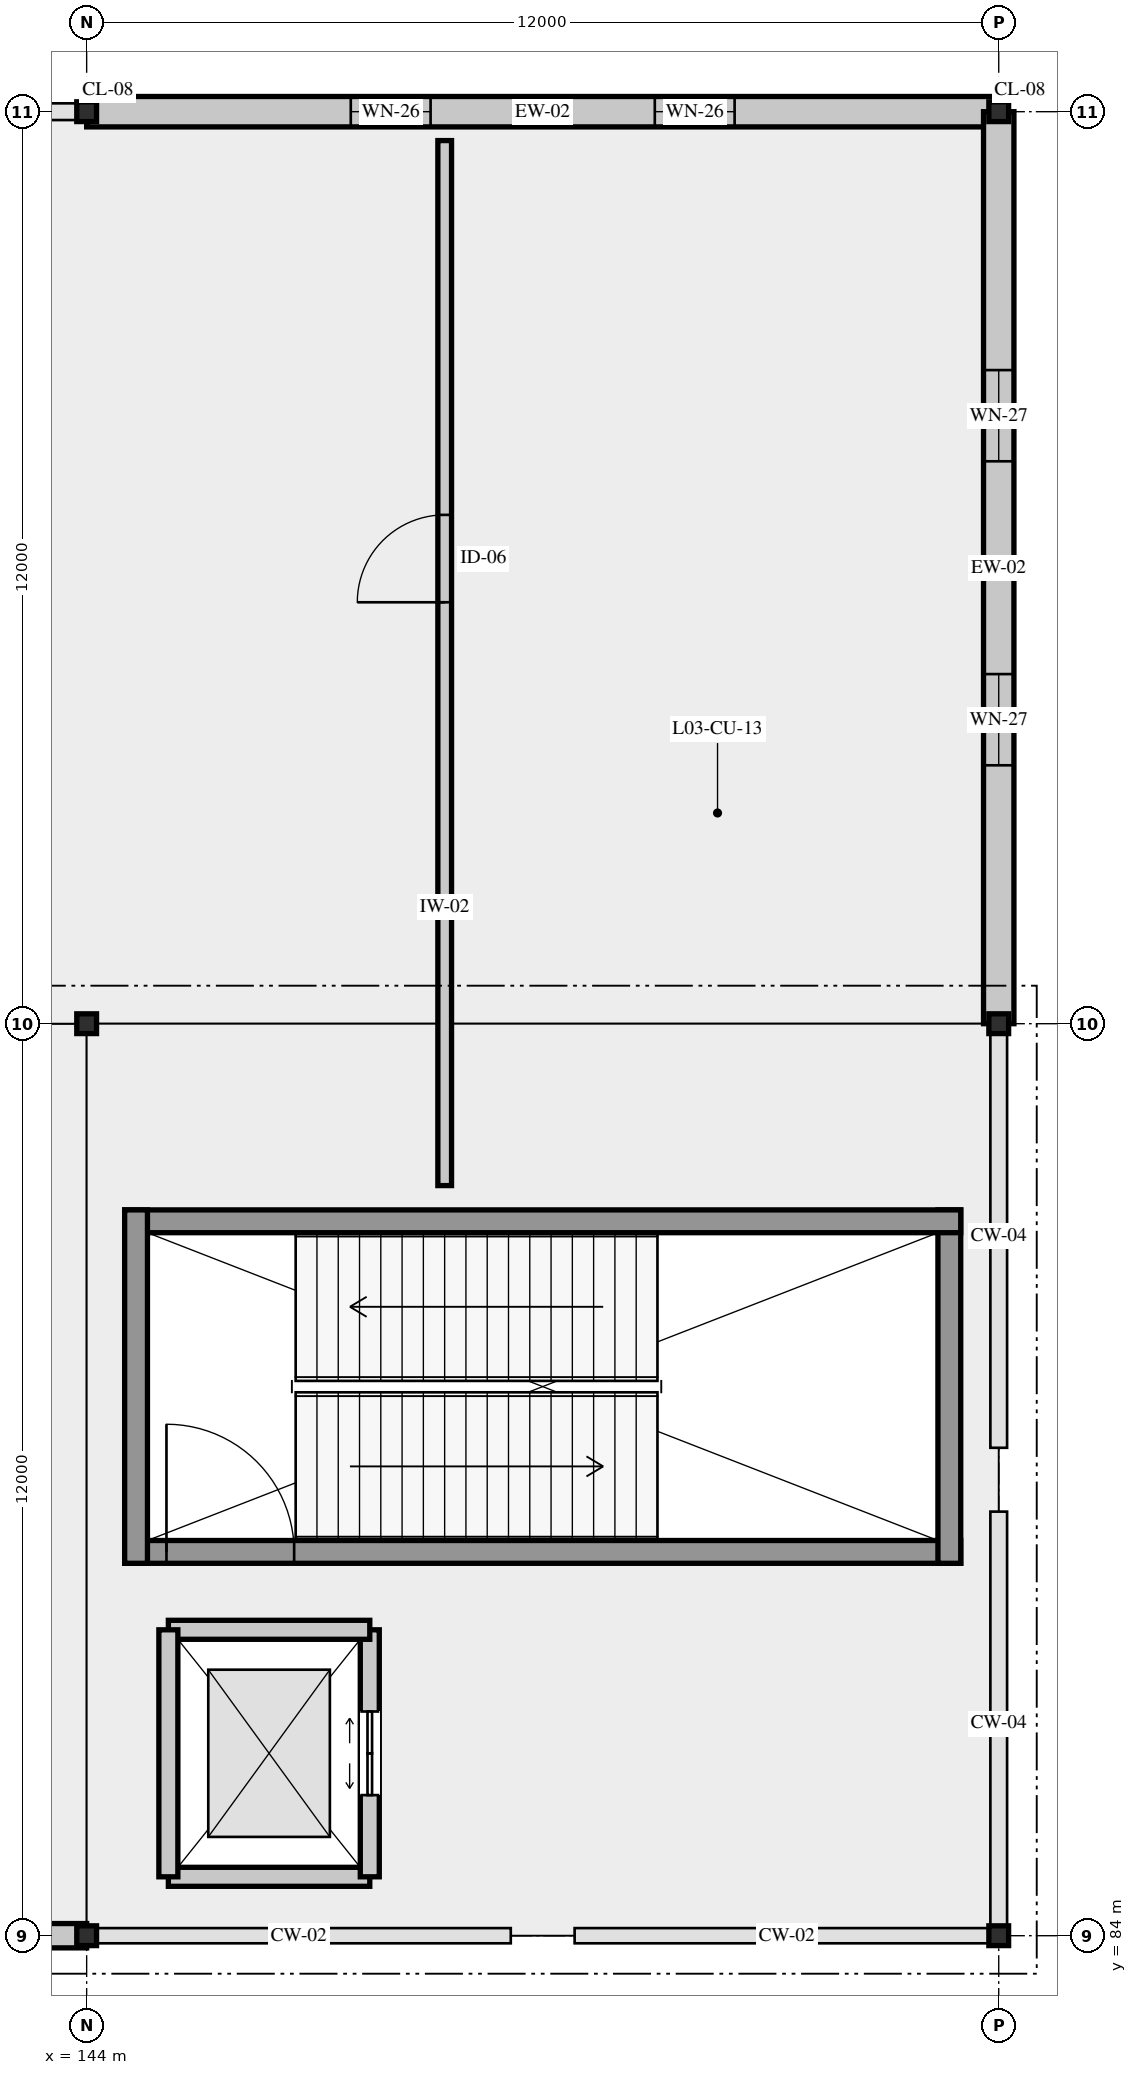
"""IFC4 building model, lengths in metres.
Left out: names, types, materials, properties, quantities, classifications, styles, units other than length and angle.
Written with IfcOpenShell. Run it as: python <this file> out.ifc"""

import sys

from ifc_helpers import new_model, si_unit, direction, frame, frame_2d, origin, origin_2d, place, context, subcontext, project, spatial, rectangle, i_section, extrude, element, fill, save


model = new_model("IFC4")
c1 = context("Model", 3, precision=1e-05, world=origin(), true_north=direction((0.0, 1.0)))
c2 = subcontext(c1, "Body", "Model", "MODEL_VIEW")
j1 = project(units=[si_unit("LENGTHUNIT", "METRE"), si_unit("PLANEANGLEUNIT", "RADIAN")], contexts=[c1])
p1 = place(None, origin())
s1 = spatial("IfcSite", under=j1, at=p1, CompositionType="ELEMENT")
p2 = place(p1, origin())
s2 = spatial("IfcBuilding", under=s1, at=p2, CompositionType="ELEMENT")
p3 = place(p2, frame((0.0, 0.0, 16.8)))
s3 = spatial("IfcBuildingStorey", under=s2, at=p3, CompositionType="ELEMENT", Elevation=16.8)
for number, where, z_axis, x_axis in (
    (1, (144.0, 84.0, 0.0), (0.0, 0.0, 1.0), (1.0, 0.0, 0.0)),
    (2, (144.0, 96.0, 0.0), (0.0, 0.0, 1.0), (1.0, 0.0, 0.0)),
    (3, (144.0, 108.0, 0.0), (0.0, 0.0, 1.0), (1.0, 0.0, 0.0)),
    (4, (156.0, 84.0, 0.0), (0.0, 0.0, 1.0), (1.0, 0.0, 0.0)),
    (5, (156.0, 96.0, 0.0), (0.0, 0.0, 1.0), (1.0, 0.0, 0.0)),
    (6, (156.0, 108.0, 0.0), (0.0, 0.0, 1.0), (1.0, 0.0, 0.0)),
):
    element("IfcColumn", number, at=place(p3, frame(where, z_axis=z_axis, x_axis=x_axis)), inside=s3, PredefinedType="COLUMN", context=c2, shape_type="SweptSolid", body=[
        extrude(i_section(OverallWidth=0.26, OverallDepth=0.26, WebThickness=0.01, FlangeThickness=0.018, FilletRadius=0.024, at=origin_2d()), origin(), (0.0, 0.0, 1.0), 6.6),
    ])
p4 = place(p3, frame((132.0, 84.0, 0.0), z_axis=(0.0, 0.0, 1.0), x_axis=(1.0, 0.0, 0.0)))
e7 = element("IfcWall", 7, at=p4, inside=s3, PredefinedType="SOLIDWALL", context=c2, shape_type="SweptSolid", body=[
    extrude(rectangle(XDim=12.0, YDim=0.32, at=frame_2d((6.0, 0.0))), origin(), (0.0, 0.0, 1.0), 5.75),
])
p5 = place(p4, frame((3.55, 0.0, 0.95)))
e8 = element("IfcOpeningElement", 8, at=p5, cuts=e7, PredefinedType="OPENING", context=c2, shape_type="SweptSolid", body=[
    extrude(rectangle(XDim=0.9, YDim=2.1, at=frame_2d((0.45, 1.05))), frame((0.0, 0.17, 0.0), z_axis=(0.0, -1.0, 0.0), x_axis=(1.0, 0.0, 0.0)), (0.0, 0.0, 1.0), 0.34),
])
p6 = place(p4, frame((7.55, 0.0, 0.95)))
e9 = element("IfcOpeningElement", 9, at=p6, cuts=e7, PredefinedType="OPENING", context=c2, shape_type="SweptSolid", body=[
    extrude(rectangle(XDim=0.9, YDim=2.1, at=frame_2d((0.45, 1.05))), frame((0.0, 0.17, 0.0), z_axis=(0.0, -1.0, 0.0), x_axis=(1.0, 0.0, 0.0)), (0.0, 0.0, 1.0), 0.34),
])
p7 = place(p3, frame((156.0, 108.0, 0.0), z_axis=(0.0, 0.0, 1.0), x_axis=(-1.0, 0.0, 0.0)))
e10 = element("IfcWall", 10, at=p7, inside=s3, PredefinedType="SOLIDWALL", context=c2, shape_type="SweptSolid", body=[
    extrude(rectangle(XDim=12.0, YDim=0.4, at=frame_2d((6.0, 0.0))), origin(), (0.0, 0.0, 1.0), 5.75),
])
p8 = place(p7, frame((3.475, 0.0, 0.95)))
e11 = element("IfcOpeningElement", 11, at=p8, cuts=e10, PredefinedType="OPENING", context=c2, shape_type="SweptSolid", body=[
    extrude(rectangle(XDim=1.05, YDim=2.1, at=frame_2d((0.525, 1.05))), frame((0.0, 0.21, 0.0), z_axis=(0.0, -1.0, 0.0), x_axis=(1.0, 0.0, 0.0)), (0.0, 0.0, 1.0), 0.42),
])
p9 = place(p7, frame((7.475, 0.0, 0.95)))
e12 = element("IfcOpeningElement", 12, at=p9, cuts=e10, PredefinedType="OPENING", context=c2, shape_type="SweptSolid", body=[
    extrude(rectangle(XDim=1.05, YDim=2.1, at=frame_2d((0.525, 1.05))), frame((0.0, 0.21, 0.0), z_axis=(0.0, -1.0, 0.0), x_axis=(1.0, 0.0, 0.0)), (0.0, 0.0, 1.0), 0.42),
])
p10 = place(p3, frame((156.0, 96.0, 0.0), z_axis=(0.0, 0.0, 1.0), x_axis=(0.0, 1.0, 0.0)))
e13 = element("IfcWall", 13, at=p10, inside=s3, PredefinedType="SOLIDWALL", context=c2, shape_type="SweptSolid", body=[
    extrude(rectangle(XDim=12.0, YDim=0.4, at=frame_2d((6.0, 0.0))), origin(), (0.0, 0.0, 1.0), 5.75),
])
p11 = place(p10, frame((3.4, 0.0, 0.95)))
e14 = element("IfcOpeningElement", 14, at=p11, cuts=e13, PredefinedType="OPENING", context=c2, shape_type="SweptSolid", body=[
    extrude(rectangle(XDim=1.2, YDim=2.1, at=frame_2d((0.6, 1.05))), frame((0.0, 0.21, 0.0), z_axis=(0.0, -1.0, 0.0), x_axis=(1.0, 0.0, 0.0)), (0.0, 0.0, 1.0), 0.42),
])
p12 = place(p10, frame((7.4, 0.0, 0.95)))
e15 = element("IfcOpeningElement", 15, at=p12, cuts=e13, PredefinedType="OPENING", context=c2, shape_type="SweptSolid", body=[
    extrude(rectangle(XDim=1.2, YDim=2.1, at=frame_2d((0.6, 1.05))), frame((0.0, 0.21, 0.0), z_axis=(0.0, -1.0, 0.0), x_axis=(1.0, 0.0, 0.0)), (0.0, 0.0, 1.0), 0.42),
])
p13 = place(p3, frame((144.5, 89.05, 0.0), z_axis=(0.0, 0.0, 1.0), x_axis=(1.0, 0.0, 0.0)))
e16 = element("IfcWall", 16, at=p13, inside=s3, PredefinedType="SHEAR", context=c2, shape_type="SweptSolid", body=[
    extrude(rectangle(XDim=11.0, YDim=0.3, at=frame_2d((5.5, 0.0))), origin(), (0.0, 0.0, 1.0), 6.35),
])
p14 = place(p13, frame((0.55, 0.0, 0.0)))
e17 = element("IfcOpeningElement", 17, at=p14, cuts=e16, PredefinedType="OPENING", context=c2, shape_type="SweptSolid", body=[
    extrude(rectangle(XDim=1.68, YDim=2.35, at=frame_2d((0.84, 1.175))), frame((0.0, 0.16, 0.0), z_axis=(0.0, -1.0, 0.0), x_axis=(1.0, 0.0, 0.0)), (0.0, 0.0, 1.0), 0.32),
])
p15 = place(p3, frame((155.35, 88.9, 0.0), z_axis=(0.0, 0.0, 1.0), x_axis=(0.0, 1.0, 0.0)))
e18 = element("IfcWall", 18, at=p15, inside=s3, PredefinedType="SHEAR", context=c2, shape_type="SweptSolid", body=[
    extrude(rectangle(XDim=4.65, YDim=0.3, at=frame_2d((2.325, 0.0))), origin(), (0.0, 0.0, 1.0), 6.35),
])
p16 = place(p3, frame((155.5, 93.4, 0.0), z_axis=(0.0, 0.0, 1.0), x_axis=(-1.0, 0.0, 0.0)))
e19 = element("IfcWall", 19, at=p16, inside=s3, PredefinedType="SHEAR", context=c2, shape_type="SweptSolid", body=[
    extrude(rectangle(XDim=11.0, YDim=0.3, at=frame_2d((5.5, 0.0))), origin(), (0.0, 0.0, 1.0), 6.35),
])
p17 = place(p3, frame((144.65, 93.55, 0.0), z_axis=(0.0, 0.0, 1.0), x_axis=(0.0, -1.0, 0.0)))
e20 = element("IfcWall", 20, at=p17, inside=s3, PredefinedType="SHEAR", context=c2, shape_type="SweptSolid", body=[
    extrude(rectangle(XDim=4.65, YDim=0.3, at=frame_2d((2.325, 0.0))), origin(), (0.0, 0.0, 1.0), 6.35),
])
p18 = place(p3, frame((145.075, 84.775, 0.0), z_axis=(0.0, 0.0, 1.0), x_axis=(1.0, 0.0, 0.0)))
e21 = element("IfcWall", 21, at=p18, inside=s3, PredefinedType="SOLIDWALL", context=c2, shape_type="SweptSolid", body=[
    extrude(rectangle(XDim=2.65, YDim=0.25, at=frame_2d((1.325, 0.0))), origin(), (0.0, 0.0, 1.0), 6.35),
])
p19 = place(p3, frame((147.725, 84.775, 0.0), z_axis=(0.0, 0.0, 1.0), x_axis=(0.0, 1.0, 0.0)))
e22 = element("IfcWall", 22, at=p19, inside=s3, PredefinedType="SOLIDWALL", context=c2, shape_type="SweptSolid", body=[
    extrude(rectangle(XDim=3.25, YDim=0.25, at=frame_2d((1.625, 0.0))), origin(), (0.0, 0.0, 1.0), 6.35),
])
p20 = place(p19, frame((1.075, 0.0, 0.0)))
e23 = element("IfcOpeningElement", 23, at=p20, cuts=e22, PredefinedType="OPENING", context=c2, shape_type="SweptSolid", body=[
    extrude(rectangle(XDim=1.1, YDim=2.2, at=frame_2d((0.55, 1.1))), frame((0.0, 0.135, 0.0), z_axis=(0.0, -1.0, 0.0), x_axis=(1.0, 0.0, 0.0)), (0.0, 0.0, 1.0), 0.27),
])
p21 = place(p3, frame((147.725, 88.025, 0.0), z_axis=(0.0, 0.0, 1.0), x_axis=(-1.0, 0.0, 0.0)))
e24 = element("IfcWall", 24, at=p21, inside=s3, PredefinedType="SOLIDWALL", context=c2, shape_type="SweptSolid", body=[
    extrude(rectangle(XDim=2.65, YDim=0.25, at=frame_2d((1.325, 0.0))), origin(), (0.0, 0.0, 1.0), 6.35),
])
p22 = place(p3, frame((145.075, 88.025, 0.0), z_axis=(0.0, 0.0, 1.0), x_axis=(0.0, -1.0, 0.0)))
e25 = element("IfcWall", 25, at=p22, inside=s3, PredefinedType="SOLIDWALL", context=c2, shape_type="SweptSolid", body=[
    extrude(rectangle(XDim=3.25, YDim=0.25, at=frame_2d((1.625, 0.0))), origin(), (0.0, 0.0, 1.0), 6.35),
])
p23 = place(p3, frame((148.711, 93.87, 0.0), z_axis=(0.0, 0.0, 1.0), x_axis=(0.0, 1.0, 0.0)))
e26 = element("IfcWall", 26, at=p23, inside=s3, PredefinedType="PARTITIONING", context=c2, shape_type="SweptSolid", body=[
    extrude(rectangle(XDim=13.75, YDim=0.18, at=frame_2d((6.875, 0.0))), origin(), (0.0, 0.0, 1.0), 5.87),
])
p24 = place(p23, frame((7.675, 0.0, 0.0)))
e27 = element("IfcOpeningElement", 27, at=p24, cuts=e26, PredefinedType="OPENING", context=c2, shape_type="SweptSolid", body=[
    extrude(rectangle(XDim=1.15, YDim=2.25, at=frame_2d((0.575, 1.125))), frame((0.0, 0.1, 0.0), z_axis=(0.0, -1.0, 0.0), x_axis=(1.0, 0.0, 0.0)), (0.0, 0.0, 1.0), 0.2),
])
p25 = place(p8, origin())
e28 = element("IfcWindow", 28, at=p25, inside=s3, PartitioningType="SINGLE_PANEL", PredefinedType="WINDOW", context=c2, shape_type="SweptSolid", body=[
    extrude(rectangle(XDim=1.05, YDim=2.1, at=frame_2d((0.525, 1.05))), frame((0.0, 0.03, 0.0), z_axis=(0.0, -1.0, 0.0), x_axis=(1.0, 0.0, 0.0)), (0.0, 0.0, 1.0), 0.06),
])
fill(e11, e28)
p26 = place(p9, origin())
e29 = element("IfcWindow", 29, at=p26, inside=s3, PartitioningType="SINGLE_PANEL", PredefinedType="WINDOW", context=c2, shape_type="SweptSolid", body=[
    extrude(rectangle(XDim=1.05, YDim=2.1, at=frame_2d((0.525, 1.05))), frame((0.0, 0.03, 0.0), z_axis=(0.0, -1.0, 0.0), x_axis=(1.0, 0.0, 0.0)), (0.0, 0.0, 1.0), 0.06),
])
fill(e12, e29)
p27 = place(p11, origin())
e30 = element("IfcWindow", 30, at=p27, inside=s3, PartitioningType="SINGLE_PANEL", PredefinedType="WINDOW", context=c2, shape_type="SweptSolid", body=[
    extrude(rectangle(XDim=1.2, YDim=2.1, at=frame_2d((0.6, 1.05))), frame((0.0, 0.03, 0.0), z_axis=(0.0, -1.0, 0.0), x_axis=(1.0, 0.0, 0.0)), (0.0, 0.0, 1.0), 0.06),
])
fill(e14, e30)
p28 = place(p12, origin())
e31 = element("IfcWindow", 31, at=p28, inside=s3, PartitioningType="SINGLE_PANEL", PredefinedType="WINDOW", context=c2, shape_type="SweptSolid", body=[
    extrude(rectangle(XDim=1.2, YDim=2.1, at=frame_2d((0.6, 1.05))), frame((0.0, 0.03, 0.0), z_axis=(0.0, -1.0, 0.0), x_axis=(1.0, 0.0, 0.0)), (0.0, 0.0, 1.0), 0.06),
])
fill(e15, e31)
p29 = place(p14, origin())
e32 = element("IfcDoor", 32, at=p29, inside=s3, OperationType="DOUBLE_DOOR_SINGLE_SWING", PredefinedType="DOOR", context=c2, shape_type="SweptSolid", body=[
    extrude(rectangle(XDim=1.68, YDim=2.35, at=frame_2d((0.84, 1.175))), frame((0.0, 0.025, 0.0), z_axis=(0.0, -1.0, 0.0), x_axis=(1.0, 0.0, 0.0)), (0.0, 0.0, 1.0), 0.05),
])
fill(e17, e32)
p30 = place(p20, origin())
e33 = element("IfcDoor", 33, at=p30, inside=s3, OperationType="SLIDING_TO_LEFT", PredefinedType="DOOR", context=c2, shape_type="SweptSolid", body=[
    extrude(rectangle(XDim=1.1, YDim=2.2, at=frame_2d((0.55, 1.1))), frame((0.0, 0.025, 0.0), z_axis=(0.0, -1.0, 0.0), x_axis=(1.0, 0.0, 0.0)), (0.0, 0.0, 1.0), 0.05),
])
fill(e23, e33)
p31 = place(p24, origin())
e34 = element("IfcDoor", 34, at=p31, inside=s3, OperationType="SINGLE_SWING_LEFT", PredefinedType="DOOR", context=c2, shape_type="SweptSolid", body=[
    extrude(rectangle(XDim=1.15, YDim=2.25, at=frame_2d((0.575, 1.125))), frame((0.0, 0.025, 0.0), z_axis=(0.0, -1.0, 0.0), x_axis=(1.0, 0.0, 0.0)), (0.0, 0.0, 1.0), 0.05),
])
fill(e27, e34)
save(model, sys.argv[1])
